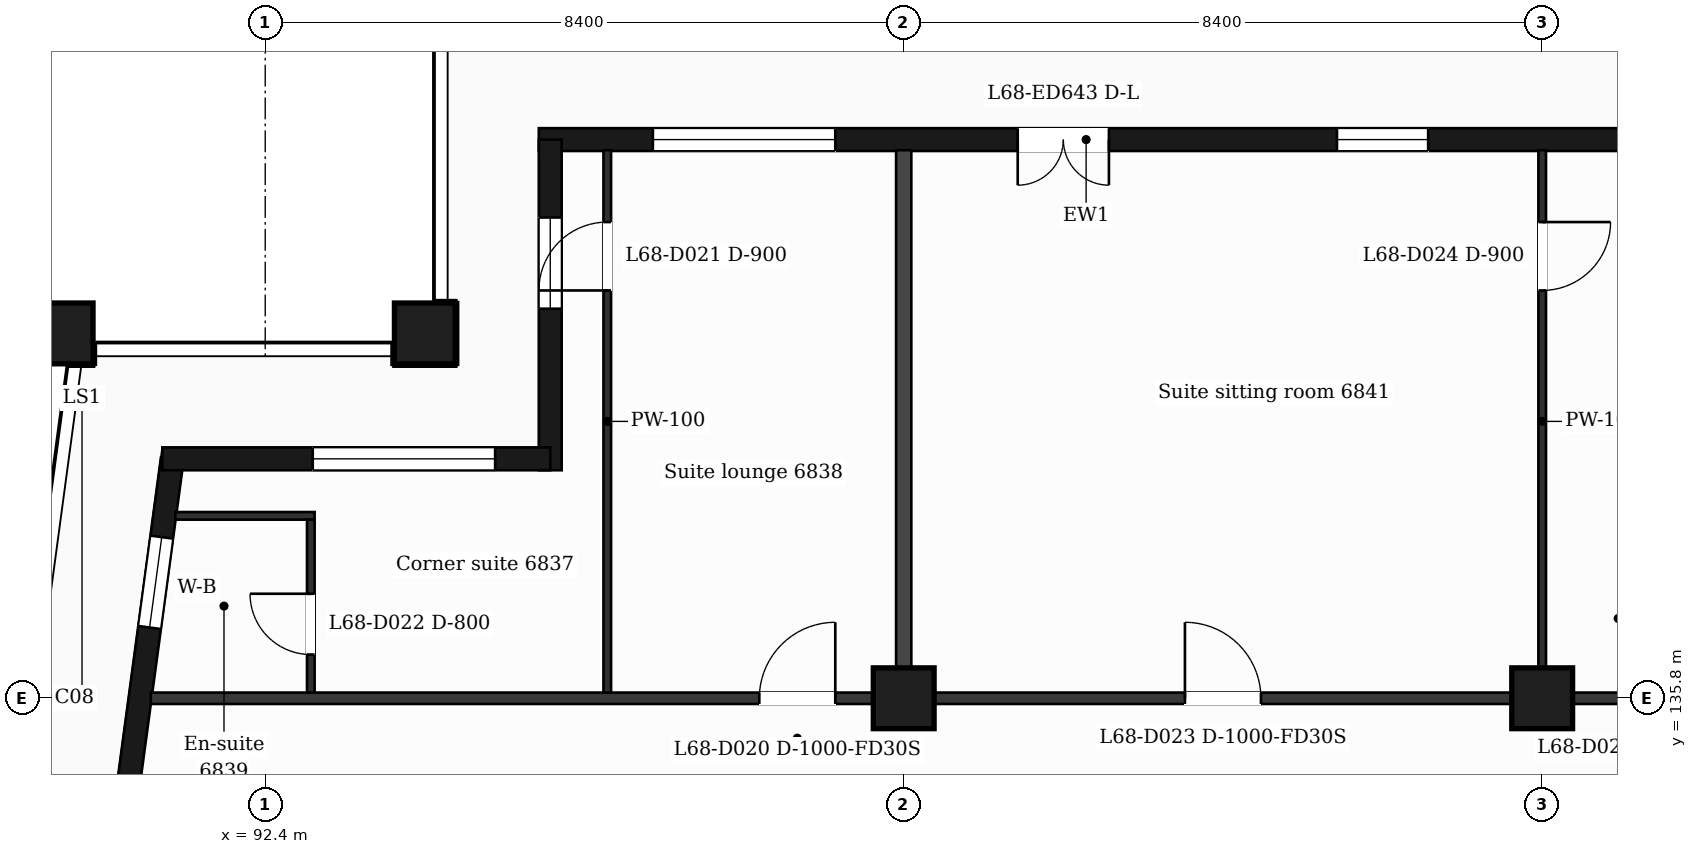
"""IFC4 building model, lengths in metres.
Left out: names, types, materials, properties, quantities, classifications, styles, units other than length and angle.
Written with IfcOpenShell. Run it as: python <this file> out.ifc"""

import sys

from ifc_helpers import new_model, si_unit, direction, frame, frame_2d, origin, origin_2d, place, context, subcontext, project, spatial, rectangle, extrude, element, fill, save


model = new_model("IFC4")
c1 = context("Model", 3, precision=1e-05, world=origin(), true_north=direction((0.0, 1.0)))
c2 = subcontext(c1, "Body", "Model", "MODEL_VIEW")
j1 = project(units=[si_unit("LENGTHUNIT", "METRE"), si_unit("PLANEANGLEUNIT", "RADIAN")], contexts=[c1])
p1 = place(None, origin())
s1 = spatial("IfcSite", under=j1, at=p1, CompositionType="ELEMENT")
p2 = place(p1, origin())
s2 = spatial("IfcBuilding", under=s1, at=p2, CompositionType="ELEMENT")
p3 = place(p2, frame((0.0, 0.0, 281.2)))
s3 = spatial("IfcBuildingStorey", under=s2, at=p3, CompositionType="ELEMENT", Elevation=281.2)
for number, where, z_axis, x_axis in (
    (1, (94.5, 140.6, 0.0), (0.0, 0.0, 1.0), (1.0, 0.0, 0.0)),
    (2, (89.735, 140.6, 0.0), (0.0, 0.0, 1.0), (1.0, 0.0, 0.0)),
    (3, (100.8, 135.8, 0.0), (0.0, 0.0, 1.0), (1.0, 0.0, 0.0)),
    (4, (109.2, 135.8, 0.0), (0.0, 0.0, 1.0), (1.0, 0.0, 0.0)),
):
    element("IfcColumn", number, at=place(p3, frame(where, z_axis=z_axis, x_axis=x_axis)), inside=s3, PredefinedType="COLUMN", context=c2, shape_type="SweptSolid", body=[
        extrude(rectangle(XDim=0.8, YDim=0.8, at=origin_2d()), origin(), (0.0, 0.0, 1.0), 3.7),
    ])
p4 = place(p3, frame((91.177, 138.95, 0.0), z_axis=(0.0, 0.0, 1.0), x_axis=(-0.133426664613, -0.991058689065, 0.0)))
e5 = element("IfcWall", 5, at=p4, inside=s3, PredefinedType="SOLIDWALL", context=c2, shape_type="SweptSolid", body=[
    extrude(rectangle(XDim=6.609, YDim=0.3, at=frame_2d((3.305, 0.0))), origin(), (0.0, 0.0, 1.0), 3.38),
])
p5 = place(p4, frame((1.039, 0.0, 0.9)))
e6 = element("IfcOpeningElement", 6, at=p5, cuts=e5, PredefinedType="OPENING", context=c2, shape_type="SweptSolid", body=[
    extrude(rectangle(XDim=1.2, YDim=2.1, at=frame_2d((0.6, 1.05))), frame((0.0, 0.16, 0.0), z_axis=(0.0, -1.0, 0.0), x_axis=(1.0, 0.0, 0.0)), (0.0, 0.0, 1.0), 0.32),
])
p6 = place(p4, frame((4.294, 0.0, 0.0)))
e7 = element("IfcOpeningElement", 7, at=p6, cuts=e5, PredefinedType="OPENING", context=c2, shape_type="SweptSolid", body=[
    extrude(rectangle(XDim=1.2, YDim=2.4, at=frame_2d((0.6, 1.2))), frame((0.0, 0.16, 0.0), z_axis=(0.0, -1.0, 0.0), x_axis=(1.0, 0.0, 0.0)), (0.0, 0.0, 1.0), 0.32),
])
p7 = place(p3, frame((110.4, 143.15, 0.0), z_axis=(0.0, 0.0, 1.0), x_axis=(-1.0, 0.0, 0.0)))
e8 = element("IfcWall", 8, at=p7, inside=s3, PredefinedType="SOLIDWALL", context=c2, shape_type="SweptSolid", body=[
    extrude(rectangle(XDim=14.4, YDim=0.3, at=frame_2d((7.2, 0.0))), origin(), (0.0, 0.0, 1.0), 3.38),
])
p8 = place(p7, frame((2.7, 0.0, 0.9)))
e9 = element("IfcOpeningElement", 9, at=p8, cuts=e8, PredefinedType="OPENING", context=c2, shape_type="SweptSolid", body=[
    extrude(rectangle(XDim=1.2, YDim=2.1, at=frame_2d((0.6, 1.05))), frame((0.0, 0.16, 0.0), z_axis=(0.0, -1.0, 0.0), x_axis=(1.0, 0.0, 0.0)), (0.0, 0.0, 1.0), 0.32),
])
p9 = place(p7, frame((6.9, 0.0, 0.0)))
e10 = element("IfcOpeningElement", 10, at=p9, cuts=e8, PredefinedType="OPENING", context=c2, shape_type="SweptSolid", body=[
    extrude(rectangle(XDim=1.2, YDim=2.4, at=frame_2d((0.6, 1.2))), frame((0.0, 0.16, 0.0), z_axis=(0.0, -1.0, 0.0), x_axis=(1.0, 0.0, 0.0)), (0.0, 0.0, 1.0), 0.32),
])
p10 = place(p7, frame((10.5, 0.0, 0.9)))
e11 = element("IfcOpeningElement", 11, at=p10, cuts=e8, PredefinedType="OPENING", context=c2, shape_type="SweptSolid", body=[
    extrude(rectangle(XDim=2.4, YDim=2.1, at=frame_2d((1.2, 1.05))), frame((0.0, 0.16, 0.0), z_axis=(0.0, -1.0, 0.0), x_axis=(1.0, 0.0, 0.0)), (0.0, 0.0, 1.0), 0.32),
])
p11 = place(p3, frame((96.15, 143.15, 0.0), z_axis=(0.0, 0.0, 1.0), x_axis=(0.0, -1.0, 0.0)))
e12 = element("IfcWall", 12, at=p11, inside=s3, PredefinedType="SOLIDWALL", context=c2, shape_type="SweptSolid", body=[
    extrude(rectangle(XDim=4.35, YDim=0.3, at=frame_2d((2.175, 0.0))), origin(), (0.0, 0.0, 1.0), 3.38),
])
p12 = place(p11, frame((1.025, 0.0, 0.9)))
e13 = element("IfcOpeningElement", 13, at=p12, cuts=e12, PredefinedType="OPENING", context=c2, shape_type="SweptSolid", body=[
    extrude(rectangle(XDim=1.2, YDim=2.1, at=frame_2d((0.6, 1.05))), frame((0.0, 0.16, 0.0), z_axis=(0.0, -1.0, 0.0), x_axis=(1.0, 0.0, 0.0)), (0.0, 0.0, 1.0), 0.32),
])
p13 = place(p3, frame((96.15, 138.95, 0.0), z_axis=(0.0, 0.0, 1.0), x_axis=(-1.0, 0.0, 0.0)))
e14 = element("IfcWall", 14, at=p13, inside=s3, PredefinedType="SOLIDWALL", context=c2, shape_type="SweptSolid", body=[
    extrude(rectangle(XDim=5.104, YDim=0.3, at=frame_2d((2.552, 0.0))), origin(), (0.0, 0.0, 1.0), 3.38),
])
p14 = place(p13, frame((0.725, 0.0, 0.9)))
e15 = element("IfcOpeningElement", 15, at=p14, cuts=e14, PredefinedType="OPENING", context=c2, shape_type="SweptSolid", body=[
    extrude(rectangle(XDim=2.4, YDim=2.1, at=frame_2d((1.2, 1.05))), frame((0.0, 0.16, 0.0), z_axis=(0.0, -1.0, 0.0), x_axis=(1.0, 0.0, 0.0)), (0.0, 0.0, 1.0), 0.32),
])
p15 = place(p3, frame((90.895, 135.8, 0.0), z_axis=(0.0, 0.0, 1.0), x_axis=(1.0, 0.0, 0.0)))
e16 = element("IfcWall", 16, at=p15, inside=s3, PredefinedType="PARTITIONING", context=c2, shape_type="SweptSolid", body=[
    extrude(rectangle(XDim=45.011, YDim=0.15, at=frame_2d((22.505, 0.0))), origin(), (0.0, 0.0, 1.0), 3.38),
])
p16 = place(p15, frame((8.005, 0.0, 0.0)))
e17 = element("IfcOpeningElement", 17, at=p16, cuts=e16, PredefinedType="OPENING", context=c2, shape_type="SweptSolid", body=[
    extrude(rectangle(XDim=1.0, YDim=2.1, at=frame_2d((0.5, 1.05))), frame((0.0, 0.085, 0.0), z_axis=(0.0, -1.0, 0.0), x_axis=(1.0, 0.0, 0.0)), (0.0, 0.0, 1.0), 0.17),
])
p17 = place(p15, frame((13.605, 0.0, 0.0)))
e18 = element("IfcOpeningElement", 18, at=p17, cuts=e16, PredefinedType="OPENING", context=c2, shape_type="SweptSolid", body=[
    extrude(rectangle(XDim=1.0, YDim=2.1, at=frame_2d((0.5, 1.05))), frame((0.0, 0.085, 0.0), z_axis=(0.0, -1.0, 0.0), x_axis=(1.0, 0.0, 0.0)), (0.0, 0.0, 1.0), 0.17),
])
p18 = place(p15, frame((29.735, 0.0, 0.0)))
e19 = element("IfcOpeningElement", 19, at=p18, cuts=e16, PredefinedType="OPENING", context=c2, shape_type="SweptSolid", body=[
    extrude(rectangle(XDim=1.0, YDim=2.1, at=frame_2d((0.5, 1.05))), frame((0.0, 0.085, 0.0), z_axis=(0.0, -1.0, 0.0), x_axis=(1.0, 0.0, 0.0)), (0.0, 0.0, 1.0), 0.17),
])
p19 = place(p15, frame((39.814, 0.0, 0.0)))
e20 = element("IfcOpeningElement", 20, at=p19, cuts=e16, PredefinedType="OPENING", context=c2, shape_type="SweptSolid", body=[
    extrude(rectangle(XDim=0.95, YDim=2.1, at=frame_2d((0.475, 1.05))), frame((0.0, 0.085, 0.0), z_axis=(0.0, -1.0, 0.0), x_axis=(1.0, 0.0, 0.0)), (0.0, 0.0, 1.0), 0.17),
])
p20 = place(p3, frame((91.218, 138.2, 0.0), z_axis=(0.0, 0.0, 1.0), x_axis=(1.0, 0.0, 0.0)))
e21 = element("IfcWall", 21, at=p20, inside=s3, PredefinedType="PARTITIONING", context=c2, shape_type="SweptSolid", body=[
    extrude(rectangle(XDim=1.832, YDim=0.1, at=frame_2d((0.916, 0.0))), origin(), (0.0, 0.0, 1.0), 3.38),
])
p21 = place(p3, frame((93.0, 135.875, 0.0), z_axis=(0.0, 0.0, 1.0), x_axis=(0.0, 1.0, 0.0)))
e22 = element("IfcWall", 22, at=p21, inside=s3, PredefinedType="PARTITIONING", context=c2, shape_type="SweptSolid", body=[
    extrude(rectangle(XDim=2.275, YDim=0.1, at=frame_2d((1.137, 0.0))), origin(), (0.0, 0.0, 1.0), 3.38),
])
p22 = place(p21, frame((0.5, 0.0, 0.0)))
e23 = element("IfcOpeningElement", 23, at=p22, cuts=e22, PredefinedType="OPENING", context=c2, shape_type="SweptSolid", body=[
    extrude(rectangle(XDim=0.8, YDim=2.1, at=frame_2d((0.4, 1.05))), frame((0.0, 0.06, 0.0), z_axis=(0.0, -1.0, 0.0), x_axis=(1.0, 0.0, 0.0)), (0.0, 0.0, 1.0), 0.12),
])
p23 = place(p3, frame((96.9, 135.875, 0.0), z_axis=(0.0, 0.0, 1.0), x_axis=(0.0, 1.0, 0.0)))
e24 = element("IfcWall", 24, at=p23, inside=s3, PredefinedType="PARTITIONING", context=c2, shape_type="SweptSolid", body=[
    extrude(rectangle(XDim=7.135, YDim=0.1, at=frame_2d((3.567, 0.0))), origin(), (0.0, 0.0, 1.0), 3.38),
])
p24 = place(p23, frame((5.29, 0.0, 0.0)))
e25 = element("IfcOpeningElement", 25, at=p24, cuts=e24, PredefinedType="OPENING", context=c2, shape_type="SweptSolid", body=[
    extrude(rectangle(XDim=0.9, YDim=2.1, at=frame_2d((0.45, 1.05))), frame((0.0, 0.06, 0.0), z_axis=(0.0, -1.0, 0.0), x_axis=(1.0, 0.0, 0.0)), (0.0, 0.0, 1.0), 0.12),
])
p25 = place(p3, frame((100.8, 135.875, 0.0), z_axis=(0.0, 0.0, 1.0), x_axis=(0.0, 1.0, 0.0)))
e26 = element("IfcWall", 26, at=p25, inside=s3, PredefinedType="PARTITIONING", context=c2, shape_type="SweptSolid", body=[
    extrude(rectangle(XDim=7.135, YDim=0.2, at=frame_2d((3.567, 0.0))), origin(), (0.0, 0.0, 1.0), 3.38),
])
p26 = place(p3, frame((109.2, 135.875, 0.0), z_axis=(0.0, 0.0, 1.0), x_axis=(0.0, 1.0, 0.0)))
e27 = element("IfcWall", 27, at=p26, inside=s3, PredefinedType="PARTITIONING", context=c2, shape_type="SweptSolid", body=[
    extrude(rectangle(XDim=7.135, YDim=0.1, at=frame_2d((3.567, 0.0))), origin(), (0.0, 0.0, 1.0), 3.38),
])
p27 = place(p26, frame((5.29, 0.0, 0.0)))
e28 = element("IfcOpeningElement", 28, at=p27, cuts=e27, PredefinedType="OPENING", context=c2, shape_type="SweptSolid", body=[
    extrude(rectangle(XDim=0.9, YDim=2.1, at=frame_2d((0.45, 1.05))), frame((0.0, 0.06, 0.0), z_axis=(0.0, -1.0, 0.0), x_axis=(1.0, 0.0, 0.0)), (0.0, 0.0, 1.0), 0.12),
])
p28 = place(p5, origin())
e29 = element("IfcWindow", 29, at=p28, inside=s3, PartitioningType="SINGLE_PANEL", PredefinedType="WINDOW", context=c2, shape_type="SweptSolid", body=[
    extrude(rectangle(XDim=1.2, YDim=2.1, at=frame_2d((0.6, 1.05))), frame((0.0, 0.03, 0.0), z_axis=(0.0, -1.0, 0.0), x_axis=(1.0, 0.0, 0.0)), (0.0, 0.0, 1.0), 0.06),
])
fill(e6, e29)
p29 = place(p8, origin())
e30 = element("IfcWindow", 30, at=p29, inside=s3, PartitioningType="SINGLE_PANEL", PredefinedType="WINDOW", context=c2, shape_type="SweptSolid", body=[
    extrude(rectangle(XDim=1.2, YDim=2.1, at=frame_2d((0.6, 1.05))), frame((0.0, 0.03, 0.0), z_axis=(0.0, -1.0, 0.0), x_axis=(1.0, 0.0, 0.0)), (0.0, 0.0, 1.0), 0.06),
])
fill(e9, e30)
p30 = place(p9, origin())
e31 = element("IfcDoor", 31, at=p30, inside=s3, OperationType="DOUBLE_DOOR_SINGLE_SWING", PredefinedType="DOOR", context=c2, shape_type="SweptSolid", body=[
    extrude(rectangle(XDim=1.2, YDim=2.4, at=frame_2d((0.6, 1.2))), frame((0.0, 0.025, 0.0), z_axis=(0.0, -1.0, 0.0), x_axis=(1.0, 0.0, 0.0)), (0.0, 0.0, 1.0), 0.05),
])
fill(e10, e31)
p31 = place(p10, origin())
e32 = element("IfcWindow", 32, at=p31, inside=s3, PartitioningType="SINGLE_PANEL", PredefinedType="WINDOW", context=c2, shape_type="SweptSolid", body=[
    extrude(rectangle(XDim=2.4, YDim=2.1, at=frame_2d((1.2, 1.05))), frame((0.0, 0.03, 0.0), z_axis=(0.0, -1.0, 0.0), x_axis=(1.0, 0.0, 0.0)), (0.0, 0.0, 1.0), 0.06),
])
fill(e11, e32)
p32 = place(p12, origin())
e33 = element("IfcWindow", 33, at=p32, inside=s3, PartitioningType="SINGLE_PANEL", PredefinedType="WINDOW", context=c2, shape_type="SweptSolid", body=[
    extrude(rectangle(XDim=1.2, YDim=2.1, at=frame_2d((0.6, 1.05))), frame((0.0, 0.03, 0.0), z_axis=(0.0, -1.0, 0.0), x_axis=(1.0, 0.0, 0.0)), (0.0, 0.0, 1.0), 0.06),
])
fill(e13, e33)
p33 = place(p14, origin())
e34 = element("IfcWindow", 34, at=p33, inside=s3, PartitioningType="SINGLE_PANEL", PredefinedType="WINDOW", context=c2, shape_type="SweptSolid", body=[
    extrude(rectangle(XDim=2.4, YDim=2.1, at=frame_2d((1.2, 1.05))), frame((0.0, 0.03, 0.0), z_axis=(0.0, -1.0, 0.0), x_axis=(1.0, 0.0, 0.0)), (0.0, 0.0, 1.0), 0.06),
])
fill(e15, e34)
p34 = place(p16, origin())
e35 = element("IfcDoor", 35, at=p34, inside=s3, OperationType="SINGLE_SWING_RIGHT", PredefinedType="DOOR", context=c2, shape_type="SweptSolid", body=[
    extrude(rectangle(XDim=1.0, YDim=2.1, at=frame_2d((0.5, 1.05))), frame((0.0, 0.025, 0.0), z_axis=(0.0, -1.0, 0.0), x_axis=(1.0, 0.0, 0.0)), (0.0, 0.0, 1.0), 0.05),
])
fill(e17, e35)
p35 = place(p24, origin())
e36 = element("IfcDoor", 36, at=p35, inside=s3, OperationType="SINGLE_SWING_LEFT", PredefinedType="DOOR", context=c2, shape_type="SweptSolid", body=[
    extrude(rectangle(XDim=0.9, YDim=2.1, at=frame_2d((0.45, 1.05))), frame((0.0, 0.025, 0.0), z_axis=(0.0, -1.0, 0.0), x_axis=(1.0, 0.0, 0.0)), (0.0, 0.0, 1.0), 0.05),
])
fill(e25, e36)
p36 = place(p22, origin())
e37 = element("IfcDoor", 37, at=p36, inside=s3, OperationType="SINGLE_SWING_RIGHT", PredefinedType="DOOR", context=c2, shape_type="SweptSolid", body=[
    extrude(rectangle(XDim=0.8, YDim=2.1, at=frame_2d((0.4, 1.05))), frame((0.0, 0.025, 0.0), z_axis=(0.0, -1.0, 0.0), x_axis=(1.0, 0.0, 0.0)), (0.0, 0.0, 1.0), 0.05),
])
fill(e23, e37)
p37 = place(p17, origin())
e38 = element("IfcDoor", 38, at=p37, inside=s3, OperationType="SINGLE_SWING_LEFT", PredefinedType="DOOR", context=c2, shape_type="SweptSolid", body=[
    extrude(rectangle(XDim=1.0, YDim=2.1, at=frame_2d((0.5, 1.05))), frame((0.0, 0.025, 0.0), z_axis=(0.0, -1.0, 0.0), x_axis=(1.0, 0.0, 0.0)), (0.0, 0.0, 1.0), 0.05),
])
fill(e18, e38)
p38 = place(p27, origin())
e39 = element("IfcDoor", 39, at=p38, inside=s3, OperationType="SINGLE_SWING_RIGHT", PredefinedType="DOOR", context=c2, shape_type="SweptSolid", body=[
    extrude(rectangle(XDim=0.9, YDim=2.1, at=frame_2d((0.45, 1.05))), frame((0.0, 0.025, 0.0), z_axis=(0.0, -1.0, 0.0), x_axis=(1.0, 0.0, 0.0)), (0.0, 0.0, 1.0), 0.05),
])
fill(e28, e39)
save(model, sys.argv[1])
